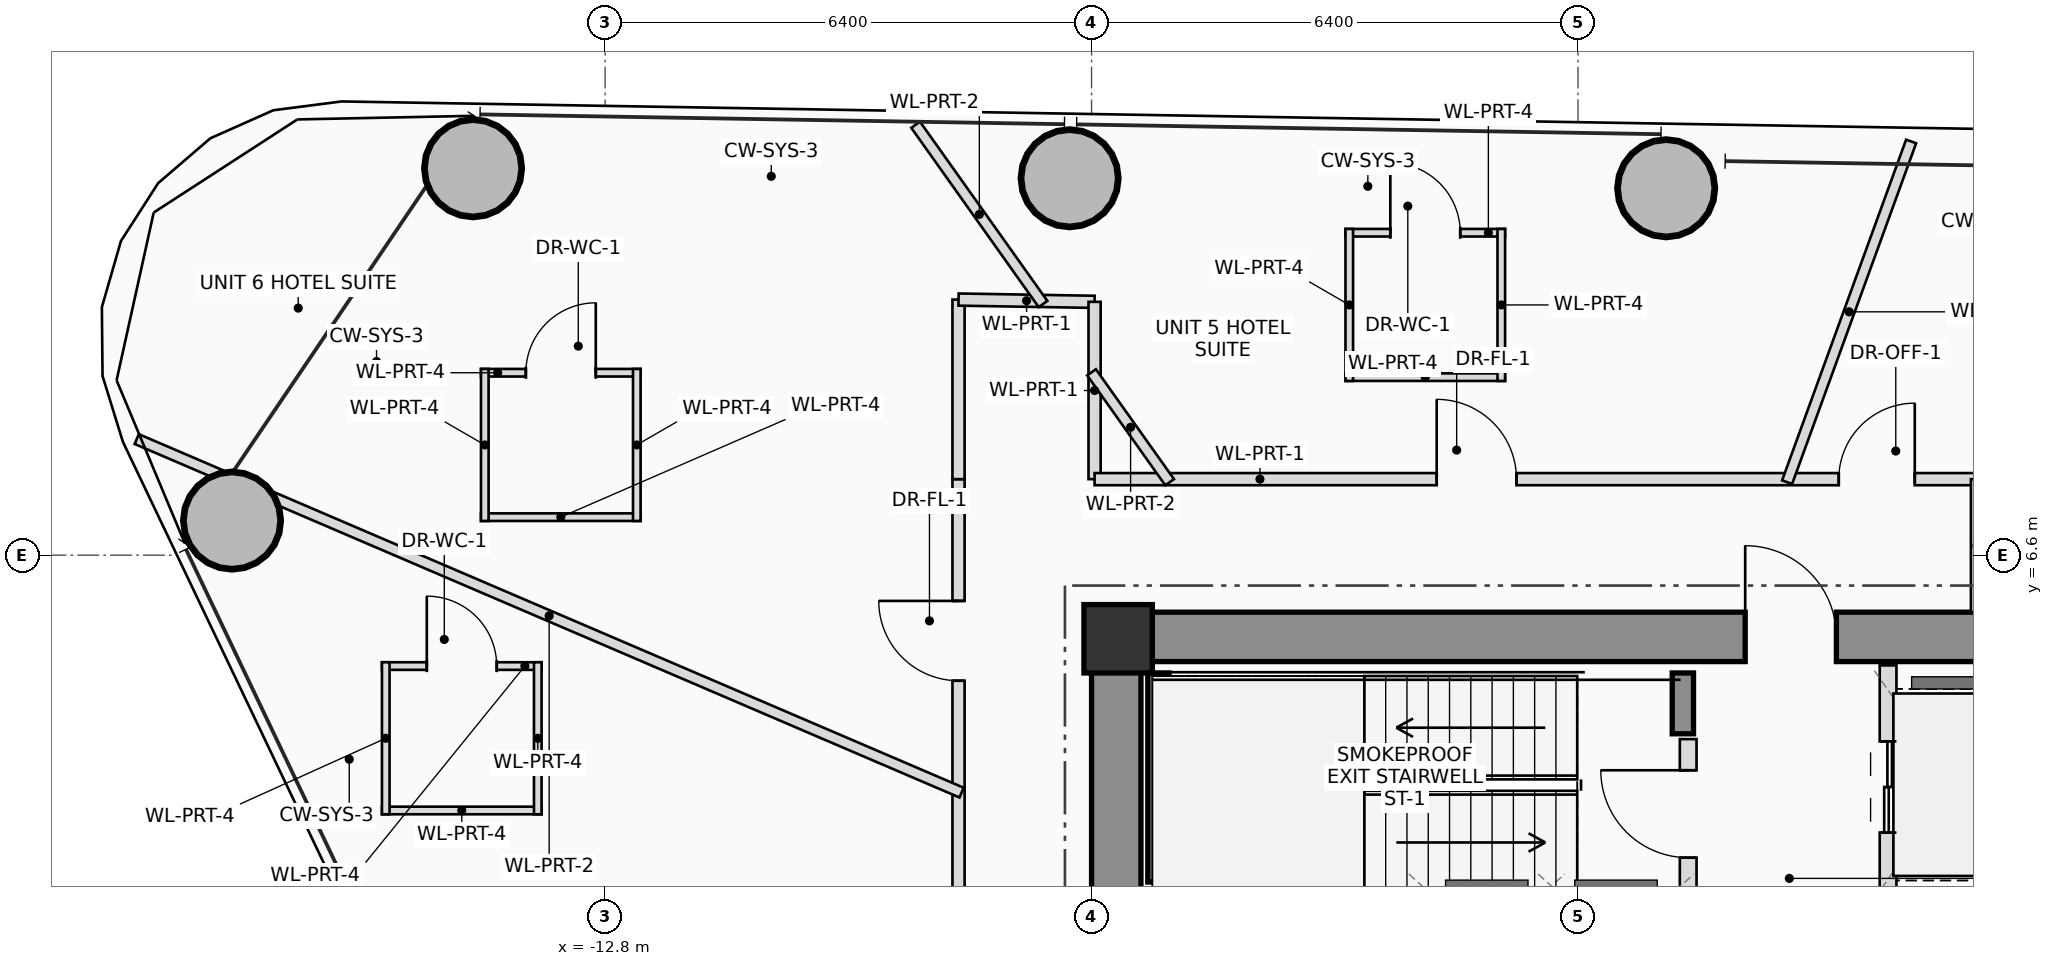
"""IFC4 building model, lengths in metres.
Left out: names, types, materials, properties, quantities, classifications, styles, units other than length and angle.
Written with IfcOpenShell. Run it as: python <this file> out.ifc"""

import sys

from ifc_helpers import new_model, si_unit, direction, frame, frame_2d, origin, origin_2d, place, context, subcontext, project, spatial, rectangle, hollow_circle, extrude, source, transform, mapped, element, fill, save


model = new_model("IFC4")
c1 = context("Model", 3, precision=1e-05, world=origin(), true_north=direction((0.0, 1.0)))
c2 = subcontext(c1, "Body", "Model", "MODEL_VIEW")
j1 = project(units=[si_unit("LENGTHUNIT", "METRE"), si_unit("PLANEANGLEUNIT", "RADIAN")], contexts=[c1])
p1 = place(None, origin())
s1 = spatial("IfcSite", under=j1, at=p1, CompositionType="ELEMENT")
p2 = place(p1, origin())
s2 = spatial("IfcBuilding", under=s1, at=p2, CompositionType="ELEMENT")
p3 = place(p2, frame((0.0, 0.0, 139.85)))
s3 = spatial("IfcBuildingStorey", under=s2, at=p3, CompositionType="ELEMENT", Elevation=139.85)
m1 = source(origin(), c2, "Body", "SweptSolid", [
    extrude(rectangle(XDim=0.9, YDim=0.9, at=origin_2d()), origin(), (0.0, 0.0, 1.0), 3.45),
])
p4 = place(p3, frame((-6.05, 5.5, 0.0), z_axis=(0.0, 0.0, 1.0), x_axis=(1.0, 0.0, 0.0)))
e1 = element("IfcColumn", 1, at=p4, inside=s3, PredefinedType="COLUMN", context=c2, shape_type="MappedRepresentation", body=[
    mapped(m1, transform((0.0, 0.0, 0.0), scale=1.0)),
])
p5 = place(p3, frame((-6.4, 5.525, 0.0), z_axis=(0.0, 0.0, 1.0), x_axis=(1.0, 0.0, 0.0)))
e2 = element("IfcWall", 2, at=p5, inside=s3, PredefinedType="SHEAR", context=c2, shape_type="SweptSolid", body=[
    extrude(rectangle(XDim=12.8, YDim=0.65, at=frame_2d((6.4, 0.0))), origin(), (0.0, 0.0, 1.0), 3.45),
])
p6 = place(p5, frame((8.6, 0.0, 0.0)))
e3 = element("IfcOpeningElement", 3, at=p6, cuts=e2, PredefinedType="OPENING", context=c2, shape_type="SweptSolid", body=[
    extrude(rectangle(XDim=1.2, YDim=2.2, at=frame_2d((0.6, 1.1))), frame((0.0, 0.335, 0.0), z_axis=(0.0, -1.0, 0.0), x_axis=(1.0, 0.0, 0.0)), (0.0, 0.0, 1.0), 0.67),
])
p7 = place(p3, frame((-6.075, 1.75, 0.0), z_axis=(0.0, 0.0, 1.0), x_axis=(0.0, 1.0, 0.0)))
e4 = element("IfcWall", 4, at=p7, inside=s3, PredefinedType="SHEAR", context=c2, shape_type="SweptSolid", body=[
    extrude(rectangle(XDim=3.45, YDim=0.65, at=frame_2d((1.725, 0.0))), origin(), (0.0, 0.0, 1.0), 3.45),
])
p8 = place(p3, frame((-5.52, 2.3, 0.0), z_axis=(0.0, 0.0, 1.0), x_axis=(0.0, 1.0, 0.0)))
e5 = element("IfcWall", 5, at=p8, inside=s3, PredefinedType="SHEAR", context=c2, shape_type="SweptSolid", body=[
    extrude(rectangle(XDim=2.75, YDim=0.28, at=frame_2d((1.375, 0.0))), origin(), (0.0, 0.0, 1.0), 3.45),
])
p9 = place(p3, frame((1.38, 4.25, 0.0), z_axis=(0.0, 0.0, 1.0), x_axis=(0.0, 1.0, 0.0)))
e6 = element("IfcWall", 6, at=p9, inside=s3, PredefinedType="SHEAR", context=c2, shape_type="SweptSolid", body=[
    extrude(rectangle(XDim=0.8, YDim=0.28, at=frame_2d((0.4, 0.0))), origin(), (0.0, 0.0, 1.0), 3.45),
])
m2 = source(origin(), c2, "Body", "SweptSolid", [
    extrude(hollow_circle(Radius=0.65, WallThickness=0.045, at=origin_2d()), origin(), (0.0, 0.0, 1.0), 3.45),
])
for number, where, z_axis, x_axis in (
    (7, (1.16, 11.427, 0.0), (0.0, 0.0, 1.0), (1.0, 0.0, 0.0)),
    (8, (-6.688, 11.558, 0.0), (0.0, 0.0, 1.0), (1.0, 0.0, 0.0)),
    (9, (-14.538, 11.69, 0.0), (0.0, 0.0, 1.0), (1.0, 0.0, 0.0)),
    (10, (-17.708, 7.055, 0.0), (0.0, 0.0, 1.0), (1.0, 0.0, 0.0)),
):
    element("IfcColumn", number, at=place(p3, frame(where, z_axis=z_axis, x_axis=x_axis)), inside=s3, PredefinedType="COLUMN", context=c2, shape_type="MappedRepresentation", body=[
        mapped(m2, transform((0.0, 0.0, 0.0), scale=1.0)),
    ])
p10 = place(p3, frame((1.45, 2.2, 0.0), z_axis=(0.0, 0.0, 1.0), x_axis=(0.0, 1.0, 0.0)))
e11 = element("IfcWall", 11, at=p10, inside=s3, PredefinedType="PLUMBINGWALL", context=c2, shape_type="SweptSolid", body=[
    extrude(rectangle(XDim=1.98, YDim=0.22, at=frame_2d((0.99, 0.0))), origin(), (0.0, 0.0, 1.0), 3.25),
])
p11 = place(p10, frame((0.42, 0.0, 0.0)))
e12 = element("IfcOpeningElement", 12, at=p11, cuts=e11, PredefinedType="OPENING", context=c2, shape_type="SweptSolid", body=[
    extrude(rectangle(XDim=1.15, YDim=2.15, at=frame_2d((0.575, 1.075))), frame((0.0, 0.12, 0.0), z_axis=(0.0, -1.0, 0.0), x_axis=(1.0, 0.0, 0.0)), (0.0, 0.0, 1.0), 0.24),
])
p12 = place(p3, frame((4.08, 2.2, 0.0), z_axis=(0.0, 0.0, 1.0), x_axis=(0.0, 1.0, 0.0)))
e13 = element("IfcWall", 13, at=p12, inside=s3, PredefinedType="PLUMBINGWALL", context=c2, shape_type="SweptSolid", body=[
    extrude(rectangle(XDim=2.95, YDim=0.22, at=frame_2d((1.475, 0.0))), origin(), (0.0, 0.0, 1.0), 3.25),
])
p13 = place(p12, frame((0.75, 0.0, 0.0)))
e14 = element("IfcOpeningElement", 14, at=p13, cuts=e13, PredefinedType="OPENING", context=c2, shape_type="SweptSolid", body=[
    extrude(rectangle(XDim=1.2, YDim=2.25, at=frame_2d((0.6, 1.125))), frame((0.0, 0.12, 0.0), z_axis=(0.0, -1.0, 0.0), x_axis=(1.0, 0.0, 0.0)), (0.0, 0.0, 1.0), 0.24),
])
p14 = place(p3, frame((-3.059, 10.842, 0.0), z_axis=(0.0, 0.0, 1.0), x_axis=(1.0, 0.0, 0.0)))
e15 = element("IfcWall", 15, at=p14, inside=s3, PredefinedType="PARTITIONING", context=c2, shape_type="SweptSolid", body=[
    extrude(rectangle(XDim=2.1, YDim=0.1, at=frame_2d((1.05, 0.0))), origin(), (0.0, 0.0, 1.0), 3.25),
])
p15 = place(p14, frame((0.59, 0.0, 0.0)))
e16 = element("IfcOpeningElement", 16, at=p15, cuts=e15, PredefinedType="OPENING", context=c2, shape_type="SweptSolid", body=[
    extrude(rectangle(XDim=0.92, YDim=2.1, at=frame_2d((0.46, 1.05))), frame((0.0, 0.06, 0.0), z_axis=(0.0, -1.0, 0.0), x_axis=(1.0, 0.0, 0.0)), (0.0, 0.0, 1.0), 0.12),
])
p16 = place(p3, frame((-0.959, 8.942, 0.0), z_axis=(0.0, 0.0, 1.0), x_axis=(-1.0, 0.0, 0.0)))
e17 = element("IfcWall", 17, at=p16, inside=s3, PredefinedType="PARTITIONING", context=c2, shape_type="SweptSolid", body=[
    extrude(rectangle(XDim=2.1, YDim=0.1, at=frame_2d((1.05, 0.0))), origin(), (0.0, 0.0, 1.0), 3.25),
])
for number, where, z_axis, x_axis in (
    (18, (-1.009, 10.892, 0.0), (0.0, 0.0, 1.0), (0.0, -1.0, 0.0)),
    (19, (-3.009, 8.892, 0.0), (0.0, 0.0, 1.0), (0.0, 1.0, 0.0)),
):
    element("IfcWall", number, at=place(p3, frame(where, z_axis=z_axis, x_axis=x_axis)), inside=s3, PredefinedType="PARTITIONING", context=c2, shape_type="SweptSolid", body=[
        extrude(rectangle(XDim=2.0, YDim=0.1, at=frame_2d((1.0, 0.0))), origin(), (0.0, 0.0, 1.0), 2.905),
    ])
p17 = place(p3, frame((-14.433, 9.0, 0.0), z_axis=(0.0, 0.0, 1.0), x_axis=(1.0, 0.0, 0.0)))
e20 = element("IfcWall", 20, at=p17, inside=s3, PredefinedType="PARTITIONING", context=c2, shape_type="SweptSolid", body=[
    extrude(rectangle(XDim=2.1, YDim=0.1, at=frame_2d((1.05, 0.0))), origin(), (0.0, 0.0, 1.0), 2.905),
])
p18 = place(p17, frame((0.59, 0.0, 0.0)))
e21 = element("IfcOpeningElement", 21, at=p18, cuts=e20, PredefinedType="OPENING", context=c2, shape_type="SweptSolid", body=[
    extrude(rectangle(XDim=0.92, YDim=2.1, at=frame_2d((0.46, 1.05))), frame((0.0, 0.06, 0.0), z_axis=(0.0, -1.0, 0.0), x_axis=(1.0, 0.0, 0.0)), (0.0, 0.0, 1.0), 0.12),
])
p19 = place(p3, frame((-12.333, 7.1, 0.0), z_axis=(0.0, 0.0, 1.0), x_axis=(-1.0, 0.0, 0.0)))
e22 = element("IfcWall", 22, at=p19, inside=s3, PredefinedType="PARTITIONING", context=c2, shape_type="SweptSolid", body=[
    extrude(rectangle(XDim=2.1, YDim=0.1, at=frame_2d((1.05, 0.0))), origin(), (0.0, 0.0, 1.0), 2.905),
])
p20 = place(p3, frame((-12.383, 9.05, 0.0), z_axis=(0.0, 0.0, 1.0), x_axis=(0.0, -1.0, 0.0)))
e23 = element("IfcWall", 23, at=p20, inside=s3, PredefinedType="PARTITIONING", context=c2, shape_type="SweptSolid", body=[
    extrude(rectangle(XDim=2.0, YDim=0.1, at=frame_2d((1.0, 0.0))), origin(), (0.0, 0.0, 1.0), 2.905),
])
p21 = place(p3, frame((-14.383, 7.05, 0.0), z_axis=(0.0, 0.0, 1.0), x_axis=(0.0, 1.0, 0.0)))
e24 = element("IfcWall", 24, at=p21, inside=s3, PredefinedType="PARTITIONING", context=c2, shape_type="SweptSolid", body=[
    extrude(rectangle(XDim=2.0, YDim=0.1, at=frame_2d((1.0, 0.0))), origin(), (0.0, 0.0, 1.0), 3.25),
])
p22 = place(p3, frame((-15.736, 5.141, 0.0), z_axis=(0.0, 0.0, 1.0), x_axis=(1.0, 0.0, 0.0)))
e25 = element("IfcWall", 25, at=p22, inside=s3, PredefinedType="PARTITIONING", context=c2, shape_type="SweptSolid", body=[
    extrude(rectangle(XDim=2.1, YDim=0.1, at=frame_2d((1.05, 0.0))), origin(), (0.0, 0.0, 1.0), 2.905),
])
p23 = place(p22, frame((0.59, 0.0, 0.0)))
e26 = element("IfcOpeningElement", 26, at=p23, cuts=e25, PredefinedType="OPENING", context=c2, shape_type="SweptSolid", body=[
    extrude(rectangle(XDim=0.92, YDim=2.1, at=frame_2d((0.46, 1.05))), frame((0.0, 0.06, 0.0), z_axis=(0.0, -1.0, 0.0), x_axis=(1.0, 0.0, 0.0)), (0.0, 0.0, 1.0), 0.12),
])
p24 = place(p3, frame((-13.636, 3.241, 0.0), z_axis=(0.0, 0.0, 1.0), x_axis=(-1.0, 0.0, 0.0)))
e27 = element("IfcWall", 27, at=p24, inside=s3, PredefinedType="PARTITIONING", context=c2, shape_type="SweptSolid", body=[
    extrude(rectangle(XDim=2.1, YDim=0.1, at=frame_2d((1.05, 0.0))), origin(), (0.0, 0.0, 1.0), 3.25),
])
p25 = place(p3, frame((-13.686, 5.191, 0.0), z_axis=(0.0, 0.0, 1.0), x_axis=(0.0, -1.0, 0.0)))
e28 = element("IfcWall", 28, at=p25, inside=s3, PredefinedType="PARTITIONING", context=c2, shape_type="SweptSolid", body=[
    extrude(rectangle(XDim=2.0, YDim=0.1, at=frame_2d((1.0, 0.0))), origin(), (0.0, 0.0, 1.0), 2.905),
])
p26 = place(p3, frame((-15.686, 3.191, 0.0), z_axis=(0.0, 0.0, 1.0), x_axis=(0.0, 1.0, 0.0)))
e29 = element("IfcWall", 29, at=p26, inside=s3, PredefinedType="PARTITIONING", context=c2, shape_type="SweptSolid", body=[
    extrude(rectangle(XDim=2.0, YDim=0.1, at=frame_2d((1.0, 0.0))), origin(), (0.0, 0.0, 1.0), 3.25),
])
p27 = place(p3, frame((-8.15, -7.6, 0.0), z_axis=(0.0, 0.0, 1.0), x_axis=(0.0, 1.0, 0.0)))
e30 = element("IfcWall", 30, at=p27, inside=s3, PredefinedType="PARTITIONING", context=c2, shape_type="SweptSolid", body=[
    extrude(rectangle(XDim=15.2, YDim=0.16, at=frame_2d((7.6, 0.0))), origin(), (0.0, 0.0, 1.0), 2.605),
])
p28 = place(p27, frame((6.538, 0.0, 0.0)))
e31 = element("IfcOpeningElement", 31, at=p28, cuts=e30, PredefinedType="OPENING", context=c2, shape_type="SweptSolid", body=[
    extrude(rectangle(XDim=1.05, YDim=2.2, at=frame_2d((0.525, 1.1))), frame((0.0, 0.09, 0.0), z_axis=(0.0, -1.0, 0.0), x_axis=(1.0, 0.0, 0.0)), (0.0, 0.0, 1.0), 0.18),
])
p29 = place(p27, frame((12.548, 0.0, 0.0)))
e32 = element("IfcOpeningElement", 32, at=p29, cuts=e30, PredefinedType="OPENING", context=c2, shape_type="SweptSolid", body=[
    extrude(rectangle(XDim=1.05, YDim=2.2, at=frame_2d((0.525, 1.1))), frame((0.0, 0.09, 0.0), z_axis=(0.0, -1.0, 0.0), x_axis=(1.0, 0.0, 0.0)), (0.0, 0.0, 1.0), 0.18),
])
p30 = place(p3, frame((-8.15, 7.6, 0.0), z_axis=(0.0, 0.0, 1.0), x_axis=(0.0, 1.0, 0.0)))
e33 = element("IfcWall", 33, at=p30, inside=s3, PredefinedType="PARTITIONING", context=c2, shape_type="SweptSolid", body=[
    extrude(rectangle(XDim=2.363, YDim=0.16, at=frame_2d((1.181, 0.0))), origin(), (0.0, 0.0, 1.0), 2.805),
])
p31 = place(p3, frame((-8.15, 9.963, 0.0), z_axis=(0.0, 0.0, 1.0), x_axis=(0.999859277964, -0.016775704705, 0.0)))
e34 = element("IfcWall", 34, at=p31, inside=s3, PredefinedType="PARTITIONING", context=c2, shape_type="SweptSolid", body=[
    extrude(rectangle(XDim=1.79, YDim=0.16, at=frame_2d((0.895, 0.0))), origin(), (0.0, 0.0, 1.0), 2.605),
])
p32 = place(p3, frame((-6.36, 9.933, 0.0), z_axis=(0.0, 0.0, 1.0), x_axis=(0.0, -1.0, 0.0)))
e35 = element("IfcWall", 35, at=p32, inside=s3, PredefinedType="PARTITIONING", context=c2, shape_type="SweptSolid", body=[
    extrude(rectangle(XDim=2.333, YDim=0.16, at=frame_2d((1.166, 0.0))), origin(), (0.0, 0.0, 1.0), 2.605),
])
p33 = place(p3, frame((-6.36, 7.6, 0.0), z_axis=(0.0, 0.0, 1.0), x_axis=(1.0, 0.0, 0.0)))
e36 = element("IfcWall", 36, at=p33, inside=s3, PredefinedType="PARTITIONING", context=c2, shape_type="SweptSolid", body=[
    extrude(rectangle(XDim=11.61, YDim=0.16, at=frame_2d((5.805, 0.0))), origin(), (0.0, 0.0, 1.0), 2.605),
])
p34 = place(p33, frame((4.501, 0.0, 0.0)))
e37 = element("IfcOpeningElement", 37, at=p34, cuts=e36, PredefinedType="OPENING", context=c2, shape_type="SweptSolid", body=[
    extrude(rectangle(XDim=1.05, YDim=2.2, at=frame_2d((0.525, 1.1))), frame((0.0, 0.09, 0.0), z_axis=(0.0, -1.0, 0.0), x_axis=(1.0, 0.0, 0.0)), (0.0, 0.0, 1.0), 0.18),
])
p35 = place(p33, frame((9.791, 0.0, 0.0)))
e38 = element("IfcOpeningElement", 38, at=p35, cuts=e36, PredefinedType="OPENING", context=c2, shape_type="SweptSolid", body=[
    extrude(rectangle(XDim=1.0, YDim=2.25, at=frame_2d((0.5, 1.125))), frame((0.0, 0.09, 0.0), z_axis=(0.0, -1.0, 0.0), x_axis=(1.0, 0.0, 0.0)), (0.0, 0.0, 1.0), 0.18),
])
p36 = place(p3, frame((5.25, 7.6, 0.0), z_axis=(0.0, 0.0, 1.0), x_axis=(0.0, -1.0, 0.0)))
e39 = element("IfcWall", 39, at=p36, inside=s3, PredefinedType="PARTITIONING", context=c2, shape_type="SweptSolid", body=[
    extrude(rectangle(XDim=1.75, YDim=0.16, at=frame_2d((0.875, 0.0))), origin(), (0.0, 0.0, 1.0), 2.605),
])
p37 = place(p3, frame((2.752, 7.56, 0.0), z_axis=(0.0, 0.0, 1.0), x_axis=(0.342010136434, 0.939696262936, 0.0)))
e40 = element("IfcWall", 40, at=p37, inside=s3, PredefinedType="PARTITIONING", context=c2, shape_type="SweptSolid", body=[
    extrude(rectangle(XDim=4.771, YDim=0.14, at=frame_2d((2.385, 0.0))), origin(), (0.0, 0.0, 1.0), 2.605),
])
p38 = place(p3, frame((-5.373, 7.56, 0.0), z_axis=(0.0, 0.0, 1.0), x_axis=(-0.579296202647, 0.815117114039, 0.0)))
e41 = element("IfcWall", 41, at=p38, inside=s3, PredefinedType="PARTITIONING", context=c2, shape_type="SweptSolid", body=[
    extrude(rectangle(XDim=1.773, YDim=0.14, at=frame_2d((0.887, 0.0))), origin(), (0.0, 0.0, 1.0), 2.605),
])
p39 = place(p3, frame((-7.038, 9.904, 0.0), z_axis=(0.0, 0.0, 1.0), x_axis=(-0.57933697246, 0.815088137775, 0.0)))
e42 = element("IfcWall", 42, at=p39, inside=s3, PredefinedType="PARTITIONING", context=c2, shape_type="SweptSolid", body=[
    extrude(rectangle(XDim=2.893, YDim=0.14, at=frame_2d((1.447, 0.0))), origin(), (0.0, 0.0, 1.0), 2.765),
])
p40 = place(p3, frame((-8.11, 3.476, 0.0), z_axis=(0.0, 0.0, 1.0), x_axis=(-0.919140751836, 0.393929280854, 0.0)))
e43 = element("IfcWall", 43, at=p40, inside=s3, PredefinedType="PARTITIONING", context=c2, shape_type="SweptSolid", body=[
    extrude(rectangle(XDim=11.807, YDim=0.14, at=frame_2d((5.903, 0.0))), origin(), (0.0, 0.0, 1.0), 2.605),
])
p41 = place(p6, origin())
e44 = element("IfcDoor", 44, at=p41, inside=s3, OperationType="SINGLE_SWING_LEFT", PredefinedType="DOOR", context=c2, shape_type="SweptSolid", body=[
    extrude(rectangle(XDim=1.2, YDim=2.2, at=frame_2d((0.6, 1.1))), frame((0.0, 0.025, 0.0), z_axis=(0.0, -1.0, 0.0), x_axis=(1.0, 0.0, 0.0)), (0.0, 0.0, 1.0), 0.05),
])
fill(e3, e44)
p42 = place(p11, origin())
e45 = element("IfcDoor", 45, at=p42, inside=s3, OperationType="SINGLE_SWING_RIGHT", PredefinedType="DOOR", context=c2, shape_type="SweptSolid", body=[
    extrude(rectangle(XDim=1.15, YDim=2.15, at=frame_2d((0.575, 1.075))), frame((0.0, 0.025, 0.0), z_axis=(0.0, -1.0, 0.0), x_axis=(1.0, 0.0, 0.0)), (0.0, 0.0, 1.0), 0.05),
])
fill(e12, e45)
p43 = place(p13, origin())
e46 = element("IfcDoor", 46, at=p43, inside=s3, OperationType="DOUBLE_DOOR_SLIDING", PredefinedType="DOOR", context=c2, shape_type="SweptSolid", body=[
    extrude(rectangle(XDim=1.2, YDim=2.25, at=frame_2d((0.6, 1.125))), frame((0.0, 0.025, 0.0), z_axis=(0.0, -1.0, 0.0), x_axis=(1.0, 0.0, 0.0)), (0.0, 0.0, 1.0), 0.05),
])
fill(e14, e46)
p44 = place(p15, origin())
e47 = element("IfcDoor", 47, at=p44, inside=s3, OperationType="SINGLE_SWING_LEFT", PredefinedType="DOOR", context=c2, shape_type="SweptSolid", body=[
    extrude(rectangle(XDim=0.92, YDim=2.1, at=frame_2d((0.46, 1.05))), frame((0.0, 0.025, 0.0), z_axis=(0.0, -1.0, 0.0), x_axis=(1.0, 0.0, 0.0)), (0.0, 0.0, 1.0), 0.05),
])
fill(e16, e47)
p45 = place(p18, origin())
e48 = element("IfcDoor", 48, at=p45, inside=s3, OperationType="SINGLE_SWING_RIGHT", PredefinedType="DOOR", context=c2, shape_type="SweptSolid", body=[
    extrude(rectangle(XDim=0.92, YDim=2.1, at=frame_2d((0.46, 1.05))), frame((0.0, 0.025, 0.0), z_axis=(0.0, -1.0, 0.0), x_axis=(1.0, 0.0, 0.0)), (0.0, 0.0, 1.0), 0.05),
])
fill(e21, e48)
p46 = place(p23, origin())
e49 = element("IfcDoor", 49, at=p46, inside=s3, OperationType="SINGLE_SWING_LEFT", PredefinedType="DOOR", context=c2, shape_type="SweptSolid", body=[
    extrude(rectangle(XDim=0.92, YDim=2.1, at=frame_2d((0.46, 1.05))), frame((0.0, 0.025, 0.0), z_axis=(0.0, -1.0, 0.0), x_axis=(1.0, 0.0, 0.0)), (0.0, 0.0, 1.0), 0.05),
])
fill(e26, e49)
p47 = place(p29, origin())
e50 = element("IfcDoor", 50, at=p47, inside=s3, OperationType="SINGLE_SWING_RIGHT", PredefinedType="DOOR", context=c2, shape_type="SweptSolid", body=[
    extrude(rectangle(XDim=1.05, YDim=2.2, at=frame_2d((0.525, 1.1))), frame((0.0, 0.025, 0.0), z_axis=(0.0, -1.0, 0.0), x_axis=(1.0, 0.0, 0.0)), (0.0, 0.0, 1.0), 0.05),
])
fill(e32, e50)
p48 = place(p34, origin())
e51 = element("IfcDoor", 51, at=p48, inside=s3, OperationType="SINGLE_SWING_LEFT", PredefinedType="DOOR", context=c2, shape_type="SweptSolid", body=[
    extrude(rectangle(XDim=1.05, YDim=2.2, at=frame_2d((0.525, 1.1))), frame((0.0, 0.025, 0.0), z_axis=(0.0, -1.0, 0.0), x_axis=(1.0, 0.0, 0.0)), (0.0, 0.0, 1.0), 0.05),
])
fill(e37, e51)
p49 = place(p35, origin())
e52 = element("IfcDoor", 52, at=p49, inside=s3, OperationType="SINGLE_SWING_RIGHT", PredefinedType="DOOR", context=c2, shape_type="SweptSolid", body=[
    extrude(rectangle(XDim=1.0, YDim=2.25, at=frame_2d((0.5, 1.125))), frame((0.0, 0.025, 0.0), z_axis=(0.0, -1.0, 0.0), x_axis=(1.0, 0.0, 0.0)), (0.0, 0.0, 1.0), 0.05),
])
fill(e38, e52)
save(model, sys.argv[1])
